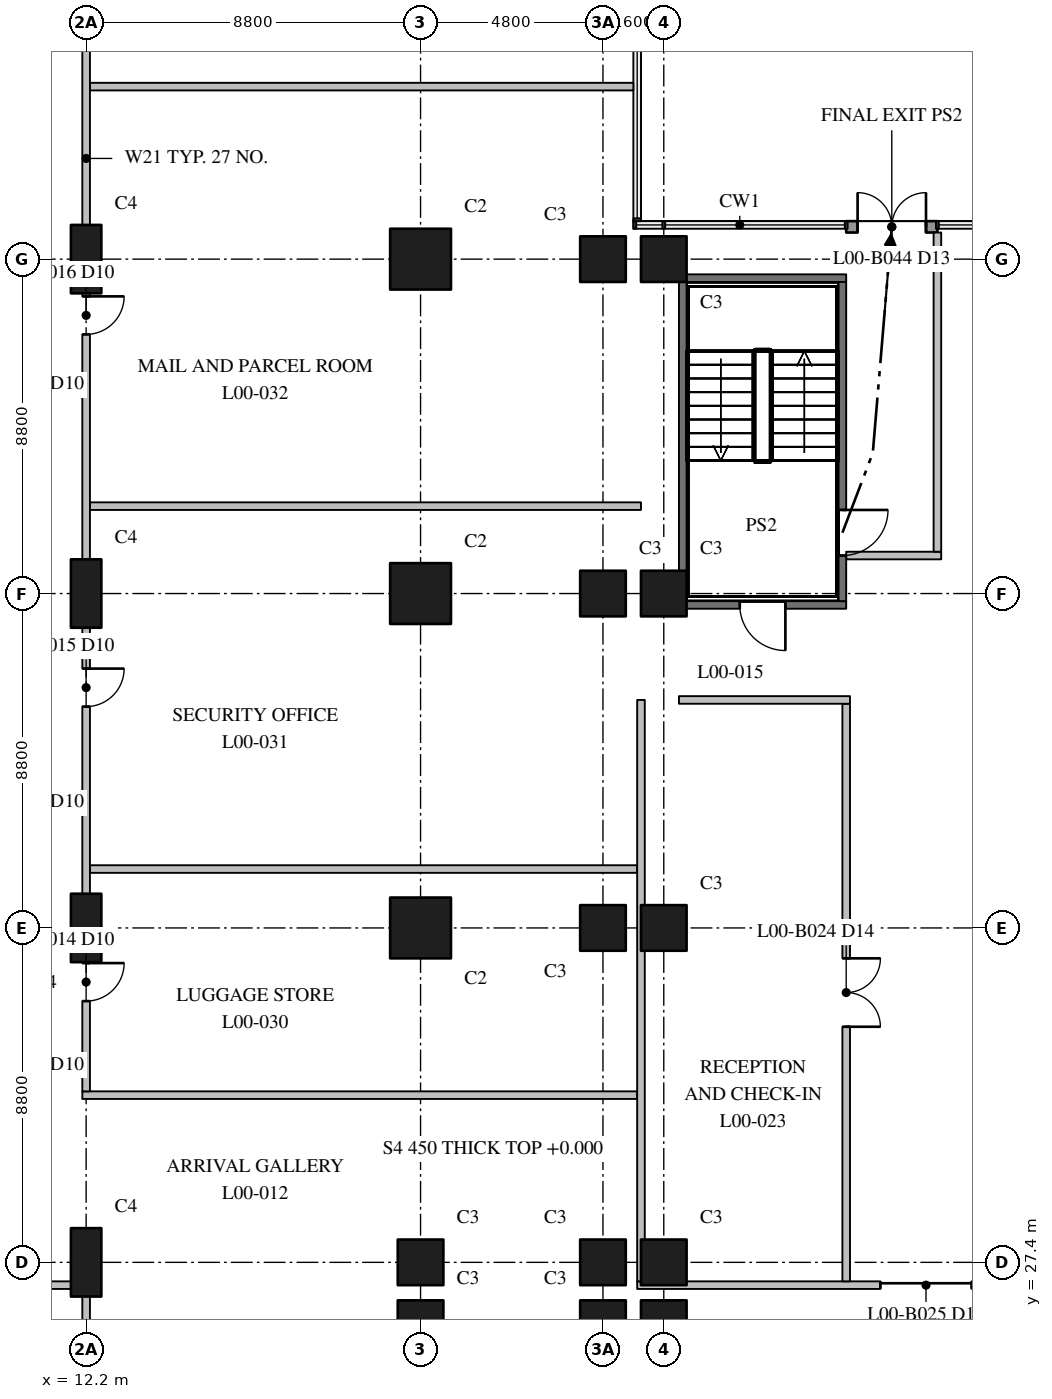
"""IFC4 building model, lengths in metres.
Left out: names, types, materials, properties, quantities, classifications, styles, units other than length and angle.
Written with IfcOpenShell. Run it as: python <this file> out.ifc"""

import sys

from ifc_helpers import new_model, si_unit, direction, frame, frame_2d, origin, origin_2d, place, context, subcontext, project, spatial, rectangle, extrude, element, fill, save


model = new_model("IFC4")
c1 = context("Model", 3, precision=1e-05, world=origin(), true_north=direction((0.0, 1.0)))
c2 = subcontext(c1, "Body", "Model", "MODEL_VIEW")
j1 = project(units=[si_unit("LENGTHUNIT", "METRE"), si_unit("PLANEANGLEUNIT", "RADIAN")], contexts=[c1])
p1 = place(None, origin())
s1 = spatial("IfcSite", under=j1, at=p1, CompositionType="ELEMENT")
p2 = place(p1, origin())
s2 = spatial("IfcBuilding", under=s1, at=p2, CompositionType="ELEMENT")
p3 = place(p2, origin())
s3 = spatial("IfcBuildingStorey", under=s2, at=p3, CompositionType="ELEMENT", Elevation=0.0)
for number, where, z_axis, x_axis in (
    (1, (12.2, 27.4, 0.0), (0.0, 0.0, 1.0), (0.0, 1.0, 0.0)),
    (2, (12.2, 36.2, 0.0), (0.0, 0.0, 1.0), (0.0, 1.0, 0.0)),
    (3, (12.2, 45.0, 0.0), (0.0, 0.0, 1.0), (0.0, 1.0, 0.0)),
    (4, (12.2, 53.8, 0.0), (0.0, 0.0, 1.0), (0.0, 1.0, 0.0)),
):
    element("IfcColumn", number, at=place(p3, frame(where, z_axis=z_axis, x_axis=x_axis)), inside=s3, PredefinedType="COLUMN", context=c2, shape_type="SweptSolid", body=[
        extrude(rectangle(XDim=1.8, YDim=0.8, at=origin_2d()), origin(), (0.0, 0.0, 1.0), 7.5),
    ])
for number, where, z_axis, x_axis in (
    (5, (21.0, 25.8, 0.0), (0.0, 0.0, 1.0), (1.0, 0.0, 0.0)),
    (6, (21.0, 27.4, 0.0), (0.0, 0.0, 1.0), (1.0, 0.0, 0.0)),
):
    element("IfcColumn", number, at=place(p3, frame(where, z_axis=z_axis, x_axis=x_axis)), inside=s3, PredefinedType="COLUMN", context=c2, shape_type="SweptSolid", body=[
        extrude(rectangle(XDim=1.2, YDim=1.2, at=origin_2d()), origin(), (0.0, 0.0, 1.0), 7.5),
    ])
for number, where, z_axis, x_axis in (
    (7, (21.0, 36.2, 0.0), (0.0, 0.0, 1.0), (1.0, 0.0, 0.0)),
    (8, (21.0, 45.0, 0.0), (0.0, 0.0, 1.0), (1.0, 0.0, 0.0)),
    (9, (21.0, 53.8, 0.0), (0.0, 0.0, 1.0), (1.0, 0.0, 0.0)),
):
    element("IfcColumn", number, at=place(p3, frame(where, z_axis=z_axis, x_axis=x_axis)), inside=s3, PredefinedType="COLUMN", context=c2, shape_type="SweptSolid", body=[
        extrude(rectangle(XDim=1.6, YDim=1.6, at=origin_2d()), origin(), (0.0, 0.0, 1.0), 7.5),
    ])
for number, where, z_axis, x_axis in (
    (10, (25.8, 25.8, 0.0), (0.0, 0.0, 1.0), (1.0, 0.0, 0.0)),
    (11, (25.8, 27.4, 0.0), (0.0, 0.0, 1.0), (1.0, 0.0, 0.0)),
    (12, (25.8, 36.2, 0.0), (0.0, 0.0, 1.0), (1.0, 0.0, 0.0)),
    (13, (25.8, 45.0, 0.0), (0.0, 0.0, 1.0), (1.0, 0.0, 0.0)),
    (14, (25.8, 53.8, 0.0), (0.0, 0.0, 1.0), (1.0, 0.0, 0.0)),
    (15, (27.4, 25.8, 0.0), (0.0, 0.0, 1.0), (1.0, 0.0, 0.0)),
    (16, (27.4, 27.4, 0.0), (0.0, 0.0, 1.0), (1.0, 0.0, 0.0)),
    (17, (27.4, 36.2, 0.0), (0.0, 0.0, 1.0), (1.0, 0.0, 0.0)),
    (18, (27.4, 45.0, 0.0), (0.0, 0.0, 1.0), (1.0, 0.0, 0.0)),
    (19, (27.4, 53.8, 0.0), (0.0, 0.0, 1.0), (1.0, 0.0, 0.0)),
):
    element("IfcColumn", number, at=place(p3, frame(where, z_axis=z_axis, x_axis=x_axis)), inside=s3, PredefinedType="COLUMN", context=c2, shape_type="SweptSolid", body=[
        extrude(rectangle(XDim=1.2, YDim=1.2, at=origin_2d()), origin(), (0.0, 0.0, 1.0), 7.5),
    ])
p4 = place(p3, frame((27.8, 44.7, 0.0), z_axis=(0.0, 0.0, 1.0), x_axis=(1.0, 0.0, 0.0)))
e20 = element("IfcWall", 20, at=p4, inside=s3, PredefinedType="SHEAR", context=c2, shape_type="SweptSolid", body=[
    extrude(rectangle(XDim=4.4, YDim=0.2, at=frame_2d((2.2, 0.0))), origin(), (0.0, 0.0, 1.0), 7.1),
])
p5 = place(p4, frame((1.6, 0.0, 0.0)))
e21 = element("IfcOpeningElement", 21, at=p5, cuts=e20, PredefinedType="OPENING", context=c2, shape_type="SweptSolid", body=[
    extrude(rectangle(XDim=1.2, YDim=2.1, at=frame_2d((0.6, 1.05))), frame((0.0, 0.11, 0.0), z_axis=(0.0, -1.0, 0.0), x_axis=(1.0, 0.0, 0.0)), (0.0, 0.0, 1.0), 0.22),
])
p6 = place(p3, frame((27.8, 53.3, 0.0), z_axis=(0.0, 0.0, 1.0), x_axis=(1.0, 0.0, 0.0)))
e22 = element("IfcWall", 22, at=p6, inside=s3, PredefinedType="SHEAR", context=c2, shape_type="SweptSolid", body=[
    extrude(rectangle(XDim=4.4, YDim=0.2, at=frame_2d((2.2, 0.0))), origin(), (0.0, 0.0, 1.0), 7.1),
])
p7 = place(p3, frame((27.9, 44.8, 0.0), z_axis=(0.0, 0.0, 1.0), x_axis=(0.0, 1.0, 0.0)))
e23 = element("IfcWall", 23, at=p7, inside=s3, PredefinedType="SHEAR", context=c2, shape_type="SweptSolid", body=[
    extrude(rectangle(XDim=8.4, YDim=0.2, at=frame_2d((4.2, 0.0))), origin(), (0.0, 0.0, 1.0), 7.1),
])
p8 = place(p3, frame((32.1, 44.8, 0.0), z_axis=(0.0, 0.0, 1.0), x_axis=(0.0, 1.0, 0.0)))
e24 = element("IfcWall", 24, at=p8, inside=s3, PredefinedType="SHEAR", context=c2, shape_type="SweptSolid", body=[
    extrude(rectangle(XDim=8.4, YDim=0.2, at=frame_2d((4.2, 0.0))), origin(), (0.0, 0.0, 1.0), 7.1),
])
p9 = place(p8, frame((1.2, 0.0, 0.0)))
e25 = element("IfcOpeningElement", 25, at=p9, cuts=e24, PredefinedType="OPENING", context=c2, shape_type="SweptSolid", body=[
    extrude(rectangle(XDim=1.2, YDim=2.1, at=frame_2d((0.6, 1.05))), frame((0.0, 0.11, 0.0), z_axis=(0.0, -1.0, 0.0), x_axis=(1.0, 0.0, 0.0)), (0.0, 0.0, 1.0), 0.22),
])
for number, where, z_axis, x_axis in (
    (26, (32.2, 46.0, 0.0), (0.0, 0.0, 1.0), (1.0, 0.0, 0.0)),
    (27, (9.8, 26.8, 0.0), (0.0, 0.0, 1.0), (1.0, 0.0, 0.0)),
):
    element("IfcWall", number, at=place(p3, frame(where, z_axis=z_axis, x_axis=x_axis)), inside=s3, PredefinedType="PARTITIONING", context=c2, shape_type="SweptSolid", body=[
        extrude(rectangle(XDim=2.5, YDim=0.2, at=frame_2d((1.25, 0.0))), origin(), (0.0, 0.0, 1.0), 7.1),
    ])
p10 = place(p3, frame((26.7, 26.8, 0.0), z_axis=(0.0, 0.0, 1.0), x_axis=(1.0, 0.0, 0.0)))
e28 = element("IfcWall", 28, at=p10, inside=s3, PredefinedType="PARTITIONING", context=c2, shape_type="SweptSolid", body=[
    extrude(rectangle(XDim=36.7, YDim=0.2, at=frame_2d((18.35, 0.0))), origin(), (0.0, 0.0, 1.0), 7.1),
])
p11 = place(p10, frame((6.4, 0.0, 0.0)))
e29 = element("IfcOpeningElement", 29, at=p11, cuts=e28, PredefinedType="OPENING", context=c2, shape_type="SweptSolid", body=[
    extrude(rectangle(XDim=2.4, YDim=2.4, at=frame_2d((1.2, 1.2))), frame((0.0, 0.11, 0.0), z_axis=(0.0, -1.0, 0.0), x_axis=(1.0, 0.0, 0.0)), (0.0, 0.0, 1.0), 0.22),
])
p12 = place(p10, frame((15.25, 0.0, 0.0)))
e30 = element("IfcOpeningElement", 30, at=p12, cuts=e28, PredefinedType="OPENING", context=c2, shape_type="SweptSolid", body=[
    extrude(rectangle(XDim=2.4, YDim=2.4, at=frame_2d((1.2, 1.2))), frame((0.0, 0.11, 0.0), z_axis=(0.0, -1.0, 0.0), x_axis=(1.0, 0.0, 0.0)), (0.0, 0.0, 1.0), 0.22),
])
p13 = place(p10, frame((22.1, 0.0, 0.0)))
e31 = element("IfcOpeningElement", 31, at=p13, cuts=e28, PredefinedType="OPENING", context=c2, shape_type="SweptSolid", body=[
    extrude(rectangle(XDim=2.4, YDim=2.4, at=frame_2d((1.2, 1.2))), frame((0.0, 0.11, 0.0), z_axis=(0.0, -1.0, 0.0), x_axis=(1.0, 0.0, 0.0)), (0.0, 0.0, 1.0), 0.22),
])
p14 = place(p10, frame((30.1, 0.0, 0.0)))
e32 = element("IfcOpeningElement", 32, at=p14, cuts=e28, PredefinedType="OPENING", context=c2, shape_type="SweptSolid", body=[
    extrude(rectangle(XDim=2.4, YDim=2.4, at=frame_2d((1.2, 1.2))), frame((0.0, 0.11, 0.0), z_axis=(0.0, -1.0, 0.0), x_axis=(1.0, 0.0, 0.0)), (0.0, 0.0, 1.0), 0.22),
])
p15 = place(p3, frame((12.1, 31.8, 0.0), z_axis=(0.0, 0.0, 1.0), x_axis=(1.0, 0.0, 0.0)))
e33 = element("IfcWall", 33, at=p15, inside=s3, PredefinedType="PARTITIONING", context=c2, shape_type="SweptSolid", body=[
    extrude(rectangle(XDim=14.6, YDim=0.2, at=frame_2d((7.3, 0.0))), origin(), (0.0, 0.0, 1.0), 7.1),
])
p16 = place(p3, frame((27.8, 42.2, 0.0), z_axis=(0.0, 0.0, 1.0), x_axis=(1.0, 0.0, 0.0)))
e34 = element("IfcWall", 34, at=p16, inside=s3, PredefinedType="PARTITIONING", context=c2, shape_type="SweptSolid", body=[
    extrude(rectangle(XDim=4.5, YDim=0.2, at=frame_2d((2.25, 0.0))), origin(), (0.0, 0.0, 1.0), 7.1),
])
p17 = place(p3, frame((12.3, 37.75, 0.0), z_axis=(0.0, 0.0, 1.0), x_axis=(1.0, 0.0, 0.0)))
e35 = element("IfcWall", 35, at=p17, inside=s3, PredefinedType="PARTITIONING", context=c2, shape_type="SweptSolid", body=[
    extrude(rectangle(XDim=14.4, YDim=0.2, at=frame_2d((7.2, 0.0))), origin(), (0.0, 0.0, 1.0), 7.1),
])
p18 = place(p3, frame((12.3, 47.3, 0.0), z_axis=(0.0, 0.0, 1.0), x_axis=(1.0, 0.0, 0.0)))
e36 = element("IfcWall", 36, at=p18, inside=s3, PredefinedType="PARTITIONING", context=c2, shape_type="SweptSolid", body=[
    extrude(rectangle(XDim=14.5, YDim=0.2, at=frame_2d((7.25, 0.0))), origin(), (0.0, 0.0, 1.0), 7.1),
])
p19 = place(p3, frame((12.3, 58.34, 0.0), z_axis=(0.0, 0.0, 1.0), x_axis=(1.0, 0.0, 0.0)))
e37 = element("IfcWall", 37, at=p19, inside=s3, PredefinedType="PARTITIONING", context=c2, shape_type="SweptSolid", body=[
    extrude(rectangle(XDim=14.3, YDim=0.2, at=frame_2d((7.15, 0.0))), origin(), (0.0, 0.0, 1.0), 7.1),
])
p20 = place(p3, frame((34.6, 46.1, 0.0), z_axis=(0.0, 0.0, 1.0), x_axis=(0.0, 1.0, 0.0)))
e38 = element("IfcWall", 38, at=p20, inside=s3, PredefinedType="PARTITIONING", context=c2, shape_type="SweptSolid", body=[
    extrude(rectangle(XDim=8.4, YDim=0.2, at=frame_2d((4.2, 0.0))), origin(), (0.0, 0.0, 1.0), 7.1),
])
p21 = place(p3, frame((12.2, 12.3, 0.0), z_axis=(0.0, 0.0, 1.0), x_axis=(0.0, 1.0, 0.0)))
e39 = element("IfcWall", 39, at=p21, inside=s3, PredefinedType="PARTITIONING", context=c2, shape_type="SweptSolid", body=[
    extrude(rectangle(XDim=14.4, YDim=0.2, at=frame_2d((7.2, 0.0))), origin(), (0.0, 0.0, 1.0), 7.1),
])
p22 = place(p21, frame((3.8, 0.0, 0.0)))
e40 = element("IfcOpeningElement", 40, at=p22, cuts=e39, PredefinedType="OPENING", context=c2, shape_type="SweptSolid", body=[
    extrude(rectangle(XDim=1.0, YDim=2.1, at=frame_2d((0.5, 1.05))), frame((0.0, 0.11, 0.0), z_axis=(0.0, -1.0, 0.0), x_axis=(1.0, 0.0, 0.0)), (0.0, 0.0, 1.0), 0.22),
])
p23 = place(p21, frame((11.1, 0.0, 0.0)))
e41 = element("IfcOpeningElement", 41, at=p23, cuts=e39, PredefinedType="OPENING", context=c2, shape_type="SweptSolid", body=[
    extrude(rectangle(XDim=1.0, YDim=2.1, at=frame_2d((0.5, 1.05))), frame((0.0, 0.11, 0.0), z_axis=(0.0, -1.0, 0.0), x_axis=(1.0, 0.0, 0.0)), (0.0, 0.0, 1.0), 0.22),
])
p24 = place(p3, frame((12.2, 31.9, 0.0), z_axis=(0.0, 0.0, 1.0), x_axis=(0.0, 1.0, 0.0)))
e42 = element("IfcWall", 42, at=p24, inside=s3, PredefinedType="PARTITIONING", context=c2, shape_type="SweptSolid", body=[
    extrude(rectangle(XDim=49.1, YDim=0.2, at=frame_2d((24.55, 0.0))), origin(), (0.0, 0.0, 1.0), 7.1),
])
p25 = place(p24, frame((2.375, 0.0, 0.0)))
e43 = element("IfcOpeningElement", 43, at=p25, cuts=e42, PredefinedType="OPENING", context=c2, shape_type="SweptSolid", body=[
    extrude(rectangle(XDim=1.0, YDim=2.1, at=frame_2d((0.5, 1.05))), frame((0.0, 0.11, 0.0), z_axis=(0.0, -1.0, 0.0), x_axis=(1.0, 0.0, 0.0)), (0.0, 0.0, 1.0), 0.22),
])
p26 = place(p24, frame((10.125, 0.0, 0.0)))
e44 = element("IfcOpeningElement", 44, at=p26, cuts=e42, PredefinedType="OPENING", context=c2, shape_type="SweptSolid", body=[
    extrude(rectangle(XDim=1.0, YDim=2.1, at=frame_2d((0.5, 1.05))), frame((0.0, 0.11, 0.0), z_axis=(0.0, -1.0, 0.0), x_axis=(1.0, 0.0, 0.0)), (0.0, 0.0, 1.0), 0.22),
])
p27 = place(p24, frame((19.92, 0.0, 0.0)))
e45 = element("IfcOpeningElement", 45, at=p27, cuts=e42, PredefinedType="OPENING", context=c2, shape_type="SweptSolid", body=[
    extrude(rectangle(XDim=1.0, YDim=2.1, at=frame_2d((0.5, 1.05))), frame((0.0, 0.11, 0.0), z_axis=(0.0, -1.0, 0.0), x_axis=(1.0, 0.0, 0.0)), (0.0, 0.0, 1.0), 0.22),
])
p28 = place(p24, frame((28.705, 0.0, 0.0)))
e46 = element("IfcOpeningElement", 46, at=p28, cuts=e42, PredefinedType="OPENING", context=c2, shape_type="SweptSolid", body=[
    extrude(rectangle(XDim=1.0, YDim=2.1, at=frame_2d((0.5, 1.05))), frame((0.0, 0.11, 0.0), z_axis=(0.0, -1.0, 0.0), x_axis=(1.0, 0.0, 0.0)), (0.0, 0.0, 1.0), 0.22),
])
p29 = place(p24, frame((35.444, 0.0, 0.0)))
e47 = element("IfcOpeningElement", 47, at=p29, cuts=e42, PredefinedType="OPENING", context=c2, shape_type="SweptSolid", body=[
    extrude(rectangle(XDim=1.0, YDim=2.1, at=frame_2d((0.5, 1.05))), frame((0.0, 0.11, 0.0), z_axis=(0.0, -1.0, 0.0), x_axis=(1.0, 0.0, 0.0)), (0.0, 0.0, 1.0), 0.22),
])
p30 = place(p24, frame((37.558, 0.0, 0.0)))
e48 = element("IfcOpeningElement", 48, at=p30, cuts=e42, PredefinedType="OPENING", context=c2, shape_type="SweptSolid", body=[
    extrude(rectangle(XDim=1.0, YDim=2.1, at=frame_2d((0.5, 1.05))), frame((0.0, 0.11, 0.0), z_axis=(0.0, -1.0, 0.0), x_axis=(1.0, 0.0, 0.0)), (0.0, 0.0, 1.0), 0.22),
])
p31 = place(p24, frame((46.015, 0.0, 0.0)))
e49 = element("IfcOpeningElement", 49, at=p31, cuts=e42, PredefinedType="OPENING", context=c2, shape_type="SweptSolid", body=[
    extrude(rectangle(XDim=1.0, YDim=2.1, at=frame_2d((0.5, 1.05))), frame((0.0, 0.11, 0.0), z_axis=(0.0, -1.0, 0.0), x_axis=(1.0, 0.0, 0.0)), (0.0, 0.0, 1.0), 0.22),
])
p32 = place(p3, frame((26.8, 26.9, 0.0), z_axis=(0.0, 0.0, 1.0), x_axis=(0.0, 1.0, 0.0)))
e50 = element("IfcWall", 50, at=p32, inside=s3, PredefinedType="PARTITIONING", context=c2, shape_type="SweptSolid", body=[
    extrude(rectangle(XDim=15.3, YDim=0.2, at=frame_2d((7.65, 0.0))), origin(), (0.0, 0.0, 1.0), 7.1),
])
p33 = place(p3, frame((32.2, 26.9, 0.0), z_axis=(0.0, 0.0, 1.0), x_axis=(0.0, 1.0, 0.0)))
e51 = element("IfcWall", 51, at=p33, inside=s3, PredefinedType="PARTITIONING", context=c2, shape_type="SweptSolid", body=[
    extrude(rectangle(XDim=15.2, YDim=0.2, at=frame_2d((7.6, 0.0))), origin(), (0.0, 0.0, 1.0), 7.1),
])
p34 = place(p33, frame((6.7, 0.0, 0.0)))
e52 = element("IfcOpeningElement", 52, at=p34, cuts=e51, PredefinedType="OPENING", context=c2, shape_type="SweptSolid", body=[
    extrude(rectangle(XDim=1.8, YDim=2.4, at=frame_2d((0.9, 1.2))), frame((0.0, 0.11, 0.0), z_axis=(0.0, -1.0, 0.0), x_axis=(1.0, 0.0, 0.0)), (0.0, 0.0, 1.0), 0.22),
])
p35 = place(p3, frame((32.2, 54.65, 0.0), z_axis=(0.0, 0.0, 1.0), x_axis=(1.0, 0.0, 0.0)))
e53 = element("IfcWall", 53, at=p35, inside=s3, PredefinedType="STANDARD", context=c2, shape_type="SweptSolid", body=[
    extrude(rectangle(XDim=2.4, YDim=0.3, at=frame_2d((1.2, 0.0))), origin(), (0.0, 0.0, 1.0), 7.1),
])
p36 = place(p35, frame((0.3, 0.0, 0.0)))
e54 = element("IfcOpeningElement", 54, at=p36, cuts=e53, PredefinedType="OPENING", context=c2, shape_type="SweptSolid", body=[
    extrude(rectangle(XDim=1.8, YDim=2.1, at=frame_2d((0.9, 1.05))), frame((0.0, 0.16, 0.0), z_axis=(0.0, -1.0, 0.0), x_axis=(1.0, 0.0, 0.0)), (0.0, 0.0, 1.0), 0.32),
])
p37 = place(p5, frame((1.2, 0.0, 0.0), z_axis=(0.0, 0.0, 1.0), x_axis=(-1.0, 0.0, 0.0)))
e55 = element("IfcDoor", 55, at=p37, inside=s3, OperationType="SINGLE_SWING_RIGHT", PredefinedType="DOOR", context=c2, shape_type="SweptSolid", body=[
    extrude(rectangle(XDim=1.2, YDim=2.1, at=frame_2d((0.6, 1.05))), frame((0.0, 0.025, 0.0), z_axis=(0.0, -1.0, 0.0), x_axis=(1.0, 0.0, 0.0)), (0.0, 0.0, 1.0), 0.05),
])
fill(e21, e55)
p38 = place(p9, frame((1.2, 0.0, 0.0), z_axis=(0.0, 0.0, 1.0), x_axis=(-1.0, 0.0, 0.0)))
e56 = element("IfcDoor", 56, at=p38, inside=s3, OperationType="SINGLE_SWING_RIGHT", PredefinedType="DOOR", context=c2, shape_type="SweptSolid", body=[
    extrude(rectangle(XDim=1.2, YDim=2.1, at=frame_2d((0.6, 1.05))), frame((0.0, 0.025, 0.0), z_axis=(0.0, -1.0, 0.0), x_axis=(1.0, 0.0, 0.0)), (0.0, 0.0, 1.0), 0.05),
])
fill(e25, e56)
p39 = place(p25, frame((1.0, 0.0, 0.0), z_axis=(0.0, 0.0, 1.0), x_axis=(-1.0, 0.0, 0.0)))
e57 = element("IfcDoor", 57, at=p39, inside=s3, OperationType="SINGLE_SWING_RIGHT", PredefinedType="DOOR", context=c2, shape_type="SweptSolid", body=[
    extrude(rectangle(XDim=1.0, YDim=2.1, at=frame_2d((0.5, 1.05))), frame((0.0, 0.025, 0.0), z_axis=(0.0, -1.0, 0.0), x_axis=(1.0, 0.0, 0.0)), (0.0, 0.0, 1.0), 0.05),
])
fill(e43, e57)
p40 = place(p26, frame((1.0, 0.0, 0.0), z_axis=(0.0, 0.0, 1.0), x_axis=(-1.0, 0.0, 0.0)))
e58 = element("IfcDoor", 58, at=p40, inside=s3, OperationType="SINGLE_SWING_RIGHT", PredefinedType="DOOR", context=c2, shape_type="SweptSolid", body=[
    extrude(rectangle(XDim=1.0, YDim=2.1, at=frame_2d((0.5, 1.05))), frame((0.0, 0.025, 0.0), z_axis=(0.0, -1.0, 0.0), x_axis=(1.0, 0.0, 0.0)), (0.0, 0.0, 1.0), 0.05),
])
fill(e44, e58)
p41 = place(p27, frame((1.0, 0.0, 0.0), z_axis=(0.0, 0.0, 1.0), x_axis=(-1.0, 0.0, 0.0)))
e59 = element("IfcDoor", 59, at=p41, inside=s3, OperationType="SINGLE_SWING_RIGHT", PredefinedType="DOOR", context=c2, shape_type="SweptSolid", body=[
    extrude(rectangle(XDim=1.0, YDim=2.1, at=frame_2d((0.5, 1.05))), frame((0.0, 0.025, 0.0), z_axis=(0.0, -1.0, 0.0), x_axis=(1.0, 0.0, 0.0)), (0.0, 0.0, 1.0), 0.05),
])
fill(e45, e59)
p42 = place(p34, frame((1.8, 0.0, 0.0), z_axis=(0.0, 0.0, 1.0), x_axis=(-1.0, 0.0, 0.0)))
e60 = element("IfcDoor", 60, at=p42, inside=s3, OperationType="DOUBLE_DOOR_SINGLE_SWING", PredefinedType="DOOR", context=c2, shape_type="SweptSolid", body=[
    extrude(rectangle(XDim=1.8, YDim=2.4, at=frame_2d((0.9, 1.2))), frame((0.0, 0.025, 0.0), z_axis=(0.0, -1.0, 0.0), x_axis=(1.0, 0.0, 0.0)), (0.0, 0.0, 1.0), 0.05),
])
fill(e52, e60)
p43 = place(p11, origin())
e61 = element("IfcDoor", 61, at=p43, inside=s3, OperationType="DOUBLE_DOOR_SLIDING", PredefinedType="DOOR", context=c2, shape_type="SweptSolid", body=[
    extrude(rectangle(XDim=2.4, YDim=2.4, at=frame_2d((1.2, 1.2))), frame((0.0, 0.025, 0.0), z_axis=(0.0, -1.0, 0.0), x_axis=(1.0, 0.0, 0.0)), (0.0, 0.0, 1.0), 0.05),
])
fill(e29, e61)
p44 = place(p36, origin())
e62 = element("IfcDoor", 62, at=p44, inside=s3, OperationType="DOUBLE_DOOR_SINGLE_SWING", PredefinedType="DOOR", context=c2, shape_type="SweptSolid", body=[
    extrude(rectangle(XDim=1.8, YDim=2.1, at=frame_2d((0.9, 1.05))), frame((0.0, 0.025, 0.0), z_axis=(0.0, -1.0, 0.0), x_axis=(1.0, 0.0, 0.0)), (0.0, 0.0, 1.0), 0.05),
])
fill(e54, e62)
save(model, sys.argv[1])
